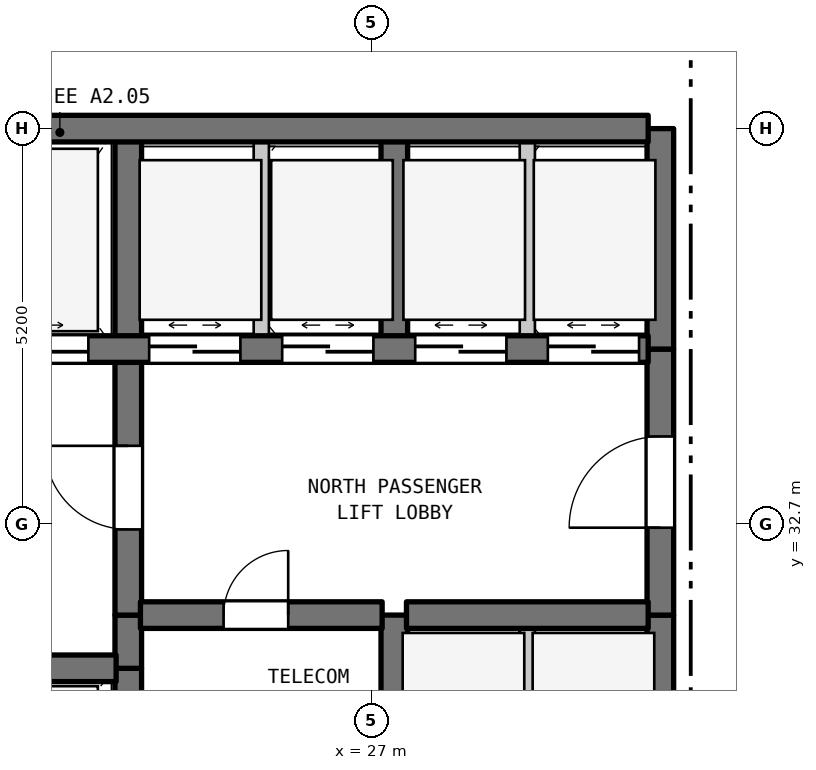
"""IFC4 building model, lengths in metres.
Left out: names, types, materials, properties, quantities, classifications, styles, units other than length and angle.
Written with IfcOpenShell. Run it as: python <this file> out.ifc"""

import sys

from ifc_helpers import new_model, si_unit, direction, frame, frame_2d, origin, place, context, subcontext, project, spatial, rectangle, extrude, element, fill, save


model = new_model("IFC4")
c1 = context("Model", 3, precision=1e-05, world=origin(), true_north=direction((0.0, 1.0)))
c2 = subcontext(c1, "Body", "Model", "MODEL_VIEW")
j1 = project(units=[si_unit("LENGTHUNIT", "METRE"), si_unit("PLANEANGLEUNIT", "RADIAN")], contexts=[c1])
p1 = place(None, origin())
s1 = spatial("IfcSite", under=j1, at=p1, CompositionType="ELEMENT")
p2 = place(p1, origin())
s2 = spatial("IfcBuilding", under=s1, at=p2, CompositionType="ELEMENT")
p3 = place(p2, frame((0.0, 0.0, 77.5)))
s3 = spatial("IfcBuildingStorey", under=s2, at=p3, CompositionType="ELEMENT", Elevation=77.5)
p4 = place(p3, frame((23.8, 29.5, 0.0), z_axis=(0.0, 0.0, 1.0), x_axis=(0.0, 1.0, 0.0)))
e1 = element("IfcWall", 1, at=p4, inside=s3, PredefinedType="SHEAR", context=c2, shape_type="SweptSolid", body=[
    extrude(rectangle(XDim=1.3, YDim=0.35, at=frame_2d((0.65, 0.0))), origin(), (0.0, 0.0, 1.0), 3.28),
])
p5 = place(p3, frame((23.8, 30.8, 0.0), z_axis=(0.0, 0.0, 1.0), x_axis=(0.0, 1.0, 0.0)))
e2 = element("IfcWall", 2, at=p5, inside=s3, PredefinedType="SHEAR", context=c2, shape_type="SweptSolid", body=[
    extrude(rectangle(XDim=0.7, YDim=0.35, at=frame_2d((0.35, 0.0))), origin(), (0.0, 0.0, 1.0), 3.28),
])
p6 = place(p3, frame((23.8, 31.5, 0.0), z_axis=(0.0, 0.0, 1.0), x_axis=(0.0, 1.0, 0.0)))
e3 = element("IfcWall", 3, at=p6, inside=s3, PredefinedType="SHEAR", context=c2, shape_type="SweptSolid", body=[
    extrude(rectangle(XDim=3.5, YDim=0.35, at=frame_2d((1.75, 0.0))), origin(), (0.0, 0.0, 1.0), 3.28),
])
p7 = place(p6, frame((1.127, 0.0, 0.0)))
e4 = element("IfcOpeningElement", 4, at=p7, cuts=e3, PredefinedType="OPENING", context=c2, shape_type="SweptSolid", body=[
    extrude(rectangle(XDim=1.1, YDim=2.15, at=frame_2d((0.55, 1.075))), frame((0.0, 0.185, 0.0), z_axis=(0.0, -1.0, 0.0), x_axis=(1.0, 0.0, 0.0)), (0.0, 0.0, 1.0), 0.37),
])
p8 = place(p3, frame((23.8, 35.0, 0.0), z_axis=(0.0, 0.0, 1.0), x_axis=(0.0, 1.0, 0.0)))
e5 = element("IfcWall", 5, at=p8, inside=s3, PredefinedType="SHEAR", context=c2, shape_type="SweptSolid", body=[
    extrude(rectangle(XDim=2.9, YDim=0.35, at=frame_2d((1.45, 0.0))), origin(), (0.0, 0.0, 1.0), 3.28),
])
p9 = place(p3, frame((25.55, 35.0, 0.0), z_axis=(0.0, 0.0, 1.0), x_axis=(0.0, 1.0, 0.0)))
e6 = element("IfcWall", 6, at=p9, inside=s3, PredefinedType="STANDARD", context=c2, shape_type="SweptSolid", body=[
    extrude(rectangle(XDim=2.9, YDim=0.2, at=frame_2d((1.45, 0.0))), origin(), (0.0, 0.0, 1.0), 3.28),
])
p10 = place(p3, frame((27.3, 29.5, 0.0), z_axis=(0.0, 0.0, 1.0), x_axis=(0.0, 1.0, 0.0)))
e7 = element("IfcWall", 7, at=p10, inside=s3, PredefinedType="SHEAR", context=c2, shape_type="SweptSolid", body=[
    extrude(rectangle(XDim=2.0, YDim=0.35, at=frame_2d((1.0, 0.0))), origin(), (0.0, 0.0, 1.0), 3.28),
])
p11 = place(p3, frame((27.3, 35.0, 0.0), z_axis=(0.0, 0.0, 1.0), x_axis=(0.0, 1.0, 0.0)))
e8 = element("IfcWall", 8, at=p11, inside=s3, PredefinedType="SHEAR", context=c2, shape_type="SweptSolid", body=[
    extrude(rectangle(XDim=2.9, YDim=0.35, at=frame_2d((1.45, 0.0))), origin(), (0.0, 0.0, 1.0), 3.28),
])
p12 = place(p3, frame((29.05, 28.9, 0.0), z_axis=(0.0, 0.0, 1.0), x_axis=(0.0, 1.0, 0.0)))
e9 = element("IfcWall", 9, at=p12, inside=s3, PredefinedType="STANDARD", context=c2, shape_type="SweptSolid", body=[
    extrude(rectangle(XDim=2.6, YDim=0.2, at=frame_2d((1.3, 0.0))), origin(), (0.0, 0.0, 1.0), 3.28),
])
p13 = place(p3, frame((29.05, 35.0, 0.0), z_axis=(0.0, 0.0, 1.0), x_axis=(0.0, 1.0, 0.0)))
e10 = element("IfcWall", 10, at=p13, inside=s3, PredefinedType="STANDARD", context=c2, shape_type="SweptSolid", body=[
    extrude(rectangle(XDim=2.9, YDim=0.2, at=frame_2d((1.45, 0.0))), origin(), (0.0, 0.0, 1.0), 3.28),
])
p14 = place(p3, frame((30.8, 28.9, 0.0), z_axis=(0.0, 0.0, 1.0), x_axis=(0.0, 1.0, 0.0)))
e11 = element("IfcWall", 11, at=p14, inside=s3, PredefinedType="SHEAR", context=c2, shape_type="SweptSolid", body=[
    extrude(rectangle(XDim=2.6, YDim=0.35, at=frame_2d((1.3, 0.0))), origin(), (0.0, 0.0, 1.0), 3.28),
])
p15 = place(p3, frame((30.8, 31.5, 0.0), z_axis=(0.0, 0.0, 1.0), x_axis=(0.0, 1.0, 0.0)))
e12 = element("IfcWall", 12, at=p15, inside=s3, PredefinedType="SHEAR", context=c2, shape_type="SweptSolid", body=[
    extrude(rectangle(XDim=3.5, YDim=0.35, at=frame_2d((1.75, 0.0))), origin(), (0.0, 0.0, 1.0), 3.28),
])
p16 = place(p15, frame((1.15, 0.0, 0.0)))
e13 = element("IfcOpeningElement", 13, at=p16, cuts=e12, PredefinedType="OPENING", context=c2, shape_type="SweptSolid", body=[
    extrude(rectangle(XDim=1.2, YDim=2.2, at=frame_2d((0.6, 1.1))), frame((0.0, 0.185, 0.0), z_axis=(0.0, -1.0, 0.0), x_axis=(1.0, 0.0, 0.0)), (0.0, 0.0, 1.0), 0.37),
])
p17 = place(p3, frame((30.8, 35.0, 0.0), z_axis=(0.0, 0.0, 1.0), x_axis=(0.0, 1.0, 0.0)))
e14 = element("IfcWall", 14, at=p17, inside=s3, PredefinedType="SHEAR", context=c2, shape_type="SweptSolid", body=[
    extrude(rectangle(XDim=2.9, YDim=0.35, at=frame_2d((1.45, 0.0))), origin(), (0.0, 0.0, 1.0), 3.28),
])
p18 = place(p3, frame((19.16, 30.8, 0.0), z_axis=(0.0, 0.0, 1.0), x_axis=(1.0, 0.0, 0.0)))
e15 = element("IfcWall", 15, at=p18, inside=s3, PredefinedType="SHEAR", context=c2, shape_type="SweptSolid", body=[
    extrude(rectangle(XDim=4.48, YDim=0.35, at=frame_2d((2.24, 0.0))), origin(), (0.0, 0.0, 1.0), 3.28),
])
p19 = place(p3, frame((23.96, 31.5, 0.0), z_axis=(0.0, 0.0, 1.0), x_axis=(1.0, 0.0, 0.0)))
e16 = element("IfcWall", 16, at=p19, inside=s3, PredefinedType="SHEAR", context=c2, shape_type="SweptSolid", body=[
    extrude(rectangle(XDim=3.18, YDim=0.35, at=frame_2d((1.59, 0.0))), origin(), (0.0, 0.0, 1.0), 3.28),
])
p20 = place(p19, frame((1.094, 0.0, 0.0)))
e17 = element("IfcOpeningElement", 17, at=p20, cuts=e16, PredefinedType="OPENING", context=c2, shape_type="SweptSolid", body=[
    extrude(rectangle(XDim=0.85, YDim=2.1, at=frame_2d((0.425, 1.05))), frame((0.0, 0.185, 0.0), z_axis=(0.0, -1.0, 0.0), x_axis=(1.0, 0.0, 0.0)), (0.0, 0.0, 1.0), 0.37),
])
p21 = place(p3, frame((27.46, 31.5, 0.0), z_axis=(0.0, 0.0, 1.0), x_axis=(1.0, 0.0, 0.0)))
e18 = element("IfcWall", 18, at=p21, inside=s3, PredefinedType="SHEAR", context=c2, shape_type="SweptSolid", body=[
    extrude(rectangle(XDim=3.18, YDim=0.35, at=frame_2d((1.59, 0.0))), origin(), (0.0, 0.0, 1.0), 3.28),
])
p22 = place(p3, frame((19.16, 35.0, 0.0), z_axis=(0.0, 0.0, 1.0), x_axis=(1.0, 0.0, 0.0)))
e19 = element("IfcWall", 19, at=p22, inside=s3, PredefinedType="SHEAR", context=c2, shape_type="SweptSolid", body=[
    extrude(rectangle(XDim=11.48, YDim=0.35, at=frame_2d((5.74, 0.0))), origin(), (0.0, 0.0, 1.0), 3.28),
])
p23 = place(p22, frame((0.365, 0.0, 0.0)))
e20 = element("IfcOpeningElement", 20, at=p23, cuts=e19, PredefinedType="OPENING", context=c2, shape_type="SweptSolid", body=[
    extrude(rectangle(XDim=1.35, YDim=2.2, at=frame_2d((0.675, 1.1))), frame((0.0, 0.185, 0.0), z_axis=(0.0, -1.0, 0.0), x_axis=(1.0, 0.0, 0.0)), (0.0, 0.0, 1.0), 0.37),
])
p24 = place(p22, frame((2.765, 0.0, 0.0)))
e21 = element("IfcOpeningElement", 21, at=p24, cuts=e19, PredefinedType="OPENING", context=c2, shape_type="SweptSolid", body=[
    extrude(rectangle(XDim=1.35, YDim=2.2, at=frame_2d((0.675, 1.1))), frame((0.0, 0.185, 0.0), z_axis=(0.0, -1.0, 0.0), x_axis=(1.0, 0.0, 0.0)), (0.0, 0.0, 1.0), 0.37),
])
p25 = place(p22, frame((4.915, 0.0, 0.0)))
e22 = element("IfcOpeningElement", 22, at=p25, cuts=e19, PredefinedType="OPENING", context=c2, shape_type="SweptSolid", body=[
    extrude(rectangle(XDim=1.2, YDim=2.2, at=frame_2d((0.6, 1.1))), frame((0.0, 0.185, 0.0), z_axis=(0.0, -1.0, 0.0), x_axis=(1.0, 0.0, 0.0)), (0.0, 0.0, 1.0), 0.37),
])
p26 = place(p22, frame((6.665, 0.0, 0.0)))
e23 = element("IfcOpeningElement", 23, at=p26, cuts=e19, PredefinedType="OPENING", context=c2, shape_type="SweptSolid", body=[
    extrude(rectangle(XDim=1.2, YDim=2.2, at=frame_2d((0.6, 1.1))), frame((0.0, 0.185, 0.0), z_axis=(0.0, -1.0, 0.0), x_axis=(1.0, 0.0, 0.0)), (0.0, 0.0, 1.0), 0.37),
])
p27 = place(p22, frame((8.415, 0.0, 0.0)))
e24 = element("IfcOpeningElement", 24, at=p27, cuts=e19, PredefinedType="OPENING", context=c2, shape_type="SweptSolid", body=[
    extrude(rectangle(XDim=1.2, YDim=2.2, at=frame_2d((0.6, 1.1))), frame((0.0, 0.185, 0.0), z_axis=(0.0, -1.0, 0.0), x_axis=(1.0, 0.0, 0.0)), (0.0, 0.0, 1.0), 0.37),
])
p28 = place(p22, frame((10.16, 0.0, 0.0)))
e25 = element("IfcOpeningElement", 25, at=p28, cuts=e19, PredefinedType="OPENING", context=c2, shape_type="SweptSolid", body=[
    extrude(rectangle(XDim=1.2, YDim=2.2, at=frame_2d((0.6, 1.1))), frame((0.0, 0.185, 0.0), z_axis=(0.0, -1.0, 0.0), x_axis=(1.0, 0.0, 0.0)), (0.0, 0.0, 1.0), 0.37),
])
p29 = place(p3, frame((19.16, 37.9, 0.0), z_axis=(0.0, 0.0, 1.0), x_axis=(1.0, 0.0, 0.0)))
e26 = element("IfcWall", 26, at=p29, inside=s3, PredefinedType="SHEAR", context=c2, shape_type="SweptSolid", body=[
    extrude(rectangle(XDim=11.48, YDim=0.35, at=frame_2d((5.74, 0.0))), origin(), (0.0, 0.0, 1.0), 3.28),
])
p30 = place(p7, origin())
e27 = element("IfcDoor", 27, at=p30, inside=s3, OperationType="SINGLE_SWING_RIGHT", PredefinedType="DOOR", context=c2, shape_type="SweptSolid", body=[
    extrude(rectangle(XDim=1.1, YDim=2.15, at=frame_2d((0.55, 1.075))), frame((0.0, 0.025, 0.0), z_axis=(0.0, -1.0, 0.0), x_axis=(1.0, 0.0, 0.0)), (0.0, 0.0, 1.0), 0.05),
])
fill(e4, e27)
p31 = place(p16, origin())
e28 = element("IfcDoor", 28, at=p31, inside=s3, OperationType="SINGLE_SWING_LEFT", PredefinedType="DOOR", context=c2, shape_type="SweptSolid", body=[
    extrude(rectangle(XDim=1.2, YDim=2.2, at=frame_2d((0.6, 1.1))), frame((0.0, 0.025, 0.0), z_axis=(0.0, -1.0, 0.0), x_axis=(1.0, 0.0, 0.0)), (0.0, 0.0, 1.0), 0.05),
])
fill(e13, e28)
p32 = place(p20, origin())
e29 = element("IfcDoor", 29, at=p32, inside=s3, OperationType="SINGLE_SWING_RIGHT", PredefinedType="DOOR", context=c2, shape_type="SweptSolid", body=[
    extrude(rectangle(XDim=0.85, YDim=2.1, at=frame_2d((0.425, 1.05))), frame((0.0, 0.025, 0.0), z_axis=(0.0, -1.0, 0.0), x_axis=(1.0, 0.0, 0.0)), (0.0, 0.0, 1.0), 0.05),
])
fill(e17, e29)
p33 = place(p24, origin())
e30 = element("IfcDoor", 30, at=p33, inside=s3, OperationType="DOUBLE_DOOR_SLIDING", PredefinedType="DOOR", context=c2, shape_type="SweptSolid", body=[
    extrude(rectangle(XDim=1.35, YDim=2.2, at=frame_2d((0.675, 1.1))), frame((0.0, 0.025, 0.0), z_axis=(0.0, -1.0, 0.0), x_axis=(1.0, 0.0, 0.0)), (0.0, 0.0, 1.0), 0.05),
])
fill(e21, e30)
p34 = place(p25, origin())
e31 = element("IfcDoor", 31, at=p34, inside=s3, OperationType="DOUBLE_DOOR_SLIDING", PredefinedType="DOOR", context=c2, shape_type="SweptSolid", body=[
    extrude(rectangle(XDim=1.2, YDim=2.2, at=frame_2d((0.6, 1.1))), frame((0.0, 0.025, 0.0), z_axis=(0.0, -1.0, 0.0), x_axis=(1.0, 0.0, 0.0)), (0.0, 0.0, 1.0), 0.05),
])
fill(e22, e31)
p35 = place(p26, origin())
e32 = element("IfcDoor", 32, at=p35, inside=s3, OperationType="DOUBLE_DOOR_SLIDING", PredefinedType="DOOR", context=c2, shape_type="SweptSolid", body=[
    extrude(rectangle(XDim=1.2, YDim=2.2, at=frame_2d((0.6, 1.1))), frame((0.0, 0.025, 0.0), z_axis=(0.0, -1.0, 0.0), x_axis=(1.0, 0.0, 0.0)), (0.0, 0.0, 1.0), 0.05),
])
fill(e23, e32)
p36 = place(p27, origin())
e33 = element("IfcDoor", 33, at=p36, inside=s3, OperationType="DOUBLE_DOOR_SLIDING", PredefinedType="DOOR", context=c2, shape_type="SweptSolid", body=[
    extrude(rectangle(XDim=1.2, YDim=2.2, at=frame_2d((0.6, 1.1))), frame((0.0, 0.025, 0.0), z_axis=(0.0, -1.0, 0.0), x_axis=(1.0, 0.0, 0.0)), (0.0, 0.0, 1.0), 0.05),
])
fill(e24, e33)
p37 = place(p28, origin())
e34 = element("IfcDoor", 34, at=p37, inside=s3, OperationType="DOUBLE_DOOR_SLIDING", PredefinedType="DOOR", context=c2, shape_type="SweptSolid", body=[
    extrude(rectangle(XDim=1.2, YDim=2.2, at=frame_2d((0.6, 1.1))), frame((0.0, 0.025, 0.0), z_axis=(0.0, -1.0, 0.0), x_axis=(1.0, 0.0, 0.0)), (0.0, 0.0, 1.0), 0.05),
])
fill(e25, e34)
save(model, sys.argv[1])
